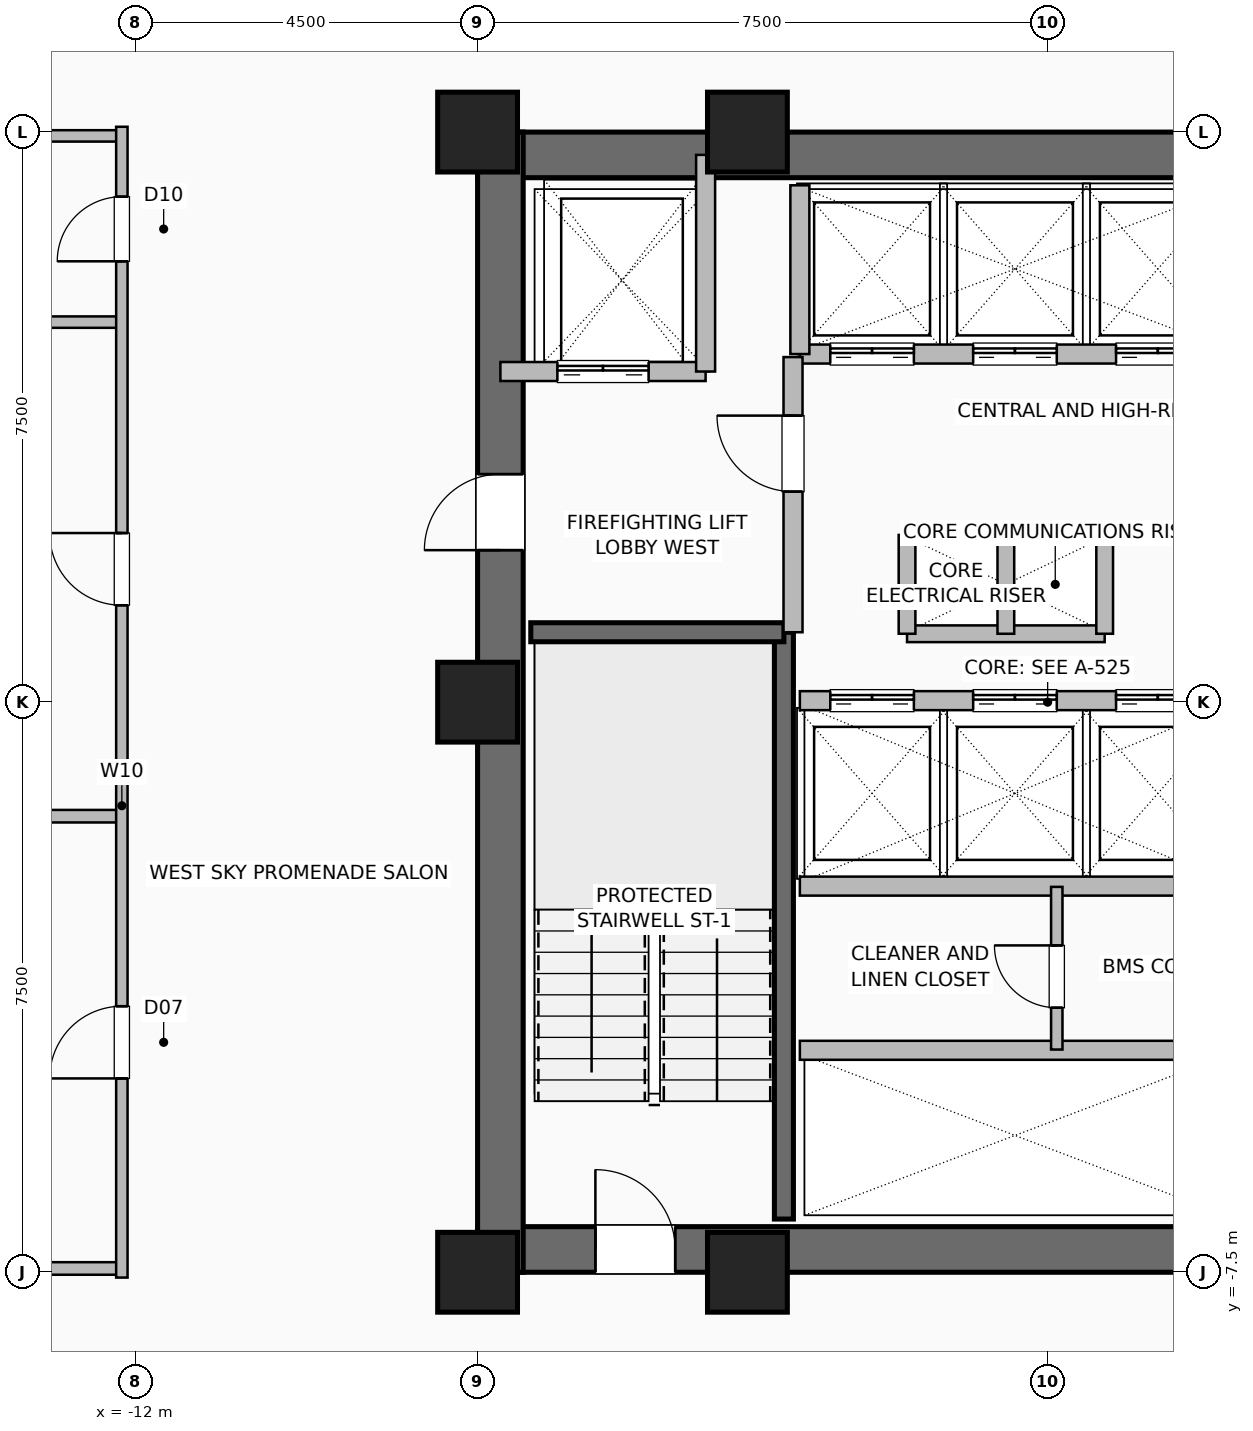
"""IFC4 building model, lengths in metres.
Left out: names, types, materials, properties, quantities, classifications, styles, units other than length and angle.
Written with IfcOpenShell. Run it as: python <this file> out.ifc"""

import sys

from ifc_helpers import new_model, si_unit, direction, frame, frame_2d, origin, origin_2d, place, context, subcontext, project, spatial, rectangle, hollow_rectangle, extrude, element, fill, save


model = new_model("IFC4")
c1 = context("Model", 3, precision=1e-05, world=origin(), true_north=direction((0.0, 1.0)))
c2 = subcontext(c1, "Body", "Model", "MODEL_VIEW")
j1 = project(units=[si_unit("LENGTHUNIT", "METRE"), si_unit("PLANEANGLEUNIT", "RADIAN")], contexts=[c1])
p1 = place(None, origin())
s1 = spatial("IfcSite", under=j1, at=p1, CompositionType="ELEMENT")
p2 = place(p1, origin())
s2 = spatial("IfcBuilding", under=s1, at=p2, CompositionType="ELEMENT")
p3 = place(p2, frame((0.0, 0.0, 97.6)))
s3 = spatial("IfcBuildingStorey", under=s2, at=p3, CompositionType="ELEMENT", Elevation=97.6)
for number, where, z_axis, x_axis in (
    (1, (-7.5, -7.5, 0.0), (0.0, 0.0, 1.0), (1.0, 0.0, 0.0)),
    (2, (-3.95, -7.5, 0.0), (0.0, 0.0, 1.0), (1.0, 0.0, 0.0)),
    (3, (-3.95, 7.5, 0.0), (0.0, 0.0, 1.0), (1.0, 0.0, 0.0)),
    (4, (-7.5, 7.5, 0.0), (0.0, 0.0, 1.0), (1.0, 0.0, 0.0)),
    (5, (-7.5, 0.0, 0.0), (0.0, 0.0, 1.0), (1.0, 0.0, 0.0)),
):
    element("IfcColumn", number, at=place(p3, frame(where, z_axis=z_axis, x_axis=x_axis)), inside=s3, PredefinedType="COLUMN", context=c2, shape_type="SweptSolid", body=[
        extrude(hollow_rectangle(XDim=1.05, YDim=1.05, WallThickness=0.05, at=origin_2d()), origin(), (0.0, 0.0, 1.0), 3.6),
    ])
p4 = place(p3, frame((-7.5, -7.2, 0.0), z_axis=(0.0, 0.0, 1.0), x_axis=(1.0, 0.0, 0.0)))
e6 = element("IfcWall", 6, at=p4, inside=s3, PredefinedType="SHEAR", context=c2, shape_type="SweptSolid", body=[
    extrude(rectangle(XDim=15.0, YDim=0.6, at=frame_2d((7.5, 0.0))), origin(), (0.0, 0.0, 1.0), 3.36),
])
p5 = place(p4, frame((1.55, 0.0, 0.0)))
e7 = element("IfcOpeningElement", 7, at=p5, cuts=e6, PredefinedType="OPENING", context=c2, shape_type="SweptSolid", body=[
    extrude(rectangle(XDim=1.05, YDim=2.08, at=frame_2d((0.525, 1.04))), frame((0.0, 0.31, 0.0), z_axis=(0.0, -1.0, 0.0), x_axis=(1.0, 0.0, 0.0)), (0.0, 0.0, 1.0), 0.62),
])
p6 = place(p4, frame((12.4, 0.0, 0.0)))
e8 = element("IfcOpeningElement", 8, at=p6, cuts=e6, PredefinedType="OPENING", context=c2, shape_type="SweptSolid", body=[
    extrude(rectangle(XDim=1.05, YDim=2.08, at=frame_2d((0.525, 1.04))), frame((0.0, 0.31, 0.0), z_axis=(0.0, -1.0, 0.0), x_axis=(1.0, 0.0, 0.0)), (0.0, 0.0, 1.0), 0.62),
])
p7 = place(p3, frame((-7.5, 7.2, 0.0), z_axis=(0.0, 0.0, 1.0), x_axis=(1.0, 0.0, 0.0)))
e9 = element("IfcWall", 9, at=p7, inside=s3, PredefinedType="SHEAR", context=c2, shape_type="SweptSolid", body=[
    extrude(rectangle(XDim=15.0, YDim=0.6, at=frame_2d((7.5, 0.0))), origin(), (0.0, 0.0, 1.0), 3.36),
])
p8 = place(p3, frame((-7.2, -7.5, 0.0), z_axis=(0.0, 0.0, 1.0), x_axis=(0.0, 1.0, 0.0)))
e10 = element("IfcWall", 10, at=p8, inside=s3, PredefinedType="SHEAR", context=c2, shape_type="SweptSolid", body=[
    extrude(rectangle(XDim=15.0, YDim=0.6, at=frame_2d((7.5, 0.0))), origin(), (0.0, 0.0, 1.0), 3.36),
])
p9 = place(p8, frame((9.5, 0.0, 0.0)))
e11 = element("IfcOpeningElement", 11, at=p9, cuts=e10, PredefinedType="OPENING", context=c2, shape_type="SweptSolid", body=[
    extrude(rectangle(XDim=1.0, YDim=2.08, at=frame_2d((0.5, 1.04))), frame((0.0, 0.31, 0.0), z_axis=(0.0, -1.0, 0.0), x_axis=(1.0, 0.0, 0.0)), (0.0, 0.0, 1.0), 0.62),
])
p10 = place(p3, frame((-3.47, -6.8, 0.0), z_axis=(0.0, 0.0, 1.0), x_axis=(0.0, 1.0, 0.0)))
e12 = element("IfcWall", 12, at=p10, inside=s3, PredefinedType="SHEAR", context=c2, shape_type="SweptSolid", body=[
    extrude(rectangle(XDim=7.72, YDim=0.25, at=frame_2d((3.86, 0.0))), origin(), (0.0, 0.0, 1.0), 3.36),
])
p11 = place(p3, frame((-6.8, 0.92, 0.0), z_axis=(0.0, 0.0, 1.0), x_axis=(1.0, 0.0, 0.0)))
e13 = element("IfcWall", 13, at=p11, inside=s3, PredefinedType="SHEAR", context=c2, shape_type="SweptSolid", body=[
    extrude(rectangle(XDim=3.33, YDim=0.25, at=frame_2d((1.665, 0.0))), origin(), (0.0, 0.0, 1.0), 3.36),
])
for number, where, z_axis, x_axis in (
    (14, (-1.85, 2.2, 0.0), (0.0, 0.0, 1.0), (1.0, 0.0, 0.0)),
    (15, (-1.85, 0.9, 0.0), (0.0, 0.0, 1.0), (1.0, 0.0, 0.0)),
):
    element("IfcWall", number, at=place(p3, frame(where, z_axis=z_axis, x_axis=x_axis)), inside=s3, PredefinedType="PARTITIONING", context=c2, shape_type="SweptSolid", body=[
        extrude(rectangle(XDim=2.6, YDim=0.22, at=frame_2d((1.3, 0.0))), origin(), (0.0, 0.0, 1.0), 3.36),
    ])
for number, where, z_axis, x_axis in (
    (16, (-0.55, 0.9, 0.0), (0.0, 0.0, 1.0), (0.0, 1.0, 0.0)),
    (17, (0.75, 0.9, 0.0), (0.0, 0.0, 1.0), (0.0, 1.0, 0.0)),
    (18, (-1.85, 0.9, 0.0), (0.0, 0.0, 1.0), (0.0, 1.0, 0.0)),
):
    element("IfcWall", number, at=place(p3, frame(where, z_axis=z_axis, x_axis=x_axis)), inside=s3, PredefinedType="PARTITIONING", context=c2, shape_type="SweptSolid", body=[
        extrude(rectangle(XDim=1.3, YDim=0.22, at=frame_2d((0.65, 0.0))), origin(), (0.0, 0.0, 1.0), 3.36),
    ])
p12 = place(p3, frame((-3.26, -4.58, 0.0), z_axis=(0.0, 0.0, 1.0), x_axis=(1.0, 0.0, 0.0)))
e19 = element("IfcWall", 19, at=p12, inside=s3, PredefinedType="SHEAR", context=c2, shape_type="SweptSolid", body=[
    extrude(rectangle(XDim=5.64, YDim=0.25, at=frame_2d((2.82, 0.0))), origin(), (0.0, 0.0, 1.0), 3.36),
])
p13 = place(p3, frame((-3.26, 0.02, 0.0), z_axis=(0.0, 0.0, 1.0), x_axis=(1.0, 0.0, 0.0)))
e20 = element("IfcWall", 20, at=p13, inside=s3, PredefinedType="SHEAR", context=c2, shape_type="SweptSolid", body=[
    extrude(rectangle(XDim=5.64, YDim=0.25, at=frame_2d((2.82, 0.0))), origin(), (0.0, 0.0, 1.0), 3.36),
])
p14 = place(p13, frame((0.4, 0.0, 0.0)))
e21 = element("IfcOpeningElement", 21, at=p14, cuts=e20, PredefinedType="OPENING", context=c2, shape_type="SweptSolid", body=[
    extrude(rectangle(XDim=1.1, YDim=2.2, at=frame_2d((0.55, 1.1))), frame((0.0, 0.135, 0.0), z_axis=(0.0, -1.0, 0.0), x_axis=(1.0, 0.0, 0.0)), (0.0, 0.0, 1.0), 0.27),
])
p15 = place(p13, frame((2.28, 0.0, 0.0)))
e22 = element("IfcOpeningElement", 22, at=p15, cuts=e20, PredefinedType="OPENING", context=c2, shape_type="SweptSolid", body=[
    extrude(rectangle(XDim=1.1, YDim=2.2, at=frame_2d((0.55, 1.1))), frame((0.0, 0.135, 0.0), z_axis=(0.0, -1.0, 0.0), x_axis=(1.0, 0.0, 0.0)), (0.0, 0.0, 1.0), 0.27),
])
p16 = place(p13, frame((4.16, 0.0, 0.0)))
e23 = element("IfcOpeningElement", 23, at=p16, cuts=e20, PredefinedType="OPENING", context=c2, shape_type="SweptSolid", body=[
    extrude(rectangle(XDim=1.1, YDim=2.2, at=frame_2d((0.55, 1.1))), frame((0.0, 0.135, 0.0), z_axis=(0.0, -1.0, 0.0), x_axis=(1.0, 0.0, 0.0)), (0.0, 0.0, 1.0), 0.27),
])
p17 = place(p3, frame((-3.26, -2.42, 0.0), z_axis=(0.0, 0.0, 1.0), x_axis=(1.0, 0.0, 0.0)))
e24 = element("IfcWall", 24, at=p17, inside=s3, PredefinedType="SHEAR", context=c2, shape_type="SweptSolid", body=[
    extrude(rectangle(XDim=5.64, YDim=0.25, at=frame_2d((2.82, 0.0))), origin(), (0.0, 0.0, 1.0), 3.36),
])
p18 = place(p3, frame((-3.26, 4.58, 0.0), z_axis=(0.0, 0.0, 1.0), x_axis=(1.0, 0.0, 0.0)))
e25 = element("IfcWall", 25, at=p18, inside=s3, PredefinedType="SHEAR", context=c2, shape_type="SweptSolid", body=[
    extrude(rectangle(XDim=5.64, YDim=0.25, at=frame_2d((2.82, 0.0))), origin(), (0.0, 0.0, 1.0), 3.36),
])
p19 = place(p18, frame((0.4, 0.0, 0.0)))
e26 = element("IfcOpeningElement", 26, at=p19, cuts=e25, PredefinedType="OPENING", context=c2, shape_type="SweptSolid", body=[
    extrude(rectangle(XDim=1.1, YDim=2.2, at=frame_2d((0.55, 1.1))), frame((0.0, 0.135, 0.0), z_axis=(0.0, -1.0, 0.0), x_axis=(1.0, 0.0, 0.0)), (0.0, 0.0, 1.0), 0.27),
])
p20 = place(p18, frame((2.28, 0.0, 0.0)))
e27 = element("IfcOpeningElement", 27, at=p20, cuts=e25, PredefinedType="OPENING", context=c2, shape_type="SweptSolid", body=[
    extrude(rectangle(XDim=1.1, YDim=2.2, at=frame_2d((0.55, 1.1))), frame((0.0, 0.135, 0.0), z_axis=(0.0, -1.0, 0.0), x_axis=(1.0, 0.0, 0.0)), (0.0, 0.0, 1.0), 0.27),
])
p21 = place(p18, frame((4.16, 0.0, 0.0)))
e28 = element("IfcOpeningElement", 28, at=p21, cuts=e25, PredefinedType="OPENING", context=c2, shape_type="SweptSolid", body=[
    extrude(rectangle(XDim=1.1, YDim=2.2, at=frame_2d((0.55, 1.1))), frame((0.0, 0.135, 0.0), z_axis=(0.0, -1.0, 0.0), x_axis=(1.0, 0.0, 0.0)), (0.0, 0.0, 1.0), 0.27),
])
p22 = place(p3, frame((-3.26, 4.58, 0.0), z_axis=(0.0, 0.0, 1.0), x_axis=(0.0, 1.0, 0.0)))
e29 = element("IfcWall", 29, at=p22, inside=s3, PredefinedType="SHEAR", context=c2, shape_type="SweptSolid", body=[
    extrude(rectangle(XDim=2.22, YDim=0.25, at=frame_2d((1.11, 0.0))), origin(), (0.0, 0.0, 1.0), 3.36),
])
p23 = place(p3, frame((-7.2, 4.35, 0.0), z_axis=(0.0, 0.0, 1.0), x_axis=(1.0, 0.0, 0.0)))
e30 = element("IfcWall", 30, at=p23, inside=s3, PredefinedType="SHEAR", context=c2, shape_type="SweptSolid", body=[
    extrude(rectangle(XDim=2.7, YDim=0.25, at=frame_2d((1.35, 0.0))), origin(), (0.0, 0.0, 1.0), 3.36),
])
p24 = place(p23, frame((0.75, 0.0, 0.0)))
e31 = element("IfcOpeningElement", 31, at=p24, cuts=e30, PredefinedType="OPENING", context=c2, shape_type="SweptSolid", body=[
    extrude(rectangle(XDim=1.2, YDim=2.2, at=frame_2d((0.6, 1.1))), frame((0.0, 0.135, 0.0), z_axis=(0.0, -1.0, 0.0), x_axis=(1.0, 0.0, 0.0)), (0.0, 0.0, 1.0), 0.27),
])
p25 = place(p3, frame((-4.5, 4.35, 0.0), z_axis=(0.0, 0.0, 1.0), x_axis=(0.0, 1.0, 0.0)))
e32 = element("IfcWall", 32, at=p25, inside=s3, PredefinedType="SHEAR", context=c2, shape_type="SweptSolid", body=[
    extrude(rectangle(XDim=2.85, YDim=0.25, at=frame_2d((1.425, 0.0))), origin(), (0.0, 0.0, 1.0), 3.36),
])
p26 = place(p3, frame((-3.35, 0.92, 0.0), z_axis=(0.0, 0.0, 1.0), x_axis=(0.0, 1.0, 0.0)))
e33 = element("IfcWall", 33, at=p26, inside=s3, PredefinedType="SHEAR", context=c2, shape_type="SweptSolid", body=[
    extrude(rectangle(XDim=3.62, YDim=0.25, at=frame_2d((1.81, 0.0))), origin(), (0.0, 0.0, 1.0), 3.36),
])
p27 = place(p26, frame((1.85, 0.0, 0.0)))
e34 = element("IfcOpeningElement", 34, at=p27, cuts=e33, PredefinedType="OPENING", context=c2, shape_type="SweptSolid", body=[
    extrude(rectangle(XDim=1.0, YDim=2.08, at=frame_2d((0.5, 1.04))), frame((0.0, 0.135, 0.0), z_axis=(0.0, -1.0, 0.0), x_axis=(1.0, 0.0, 0.0)), (0.0, 0.0, 1.0), 0.27),
])
p28 = place(p3, frame((0.12, -4.57, 0.0), z_axis=(0.0, 0.0, 1.0), x_axis=(0.0, 1.0, 0.0)))
e35 = element("IfcWall", 35, at=p28, inside=s3, PredefinedType="PARTITIONING", context=c2, shape_type="SweptSolid", body=[
    extrude(rectangle(XDim=2.14, YDim=0.15, at=frame_2d((1.07, 0.0))), origin(), (0.0, 0.0, 1.0), 3.36),
])
p29 = place(p28, frame((0.55, 0.0, 0.0)))
e36 = element("IfcOpeningElement", 36, at=p29, cuts=e35, PredefinedType="OPENING", context=c2, shape_type="SweptSolid", body=[
    extrude(rectangle(XDim=0.82, YDim=2.05, at=frame_2d((0.41, 1.025))), frame((0.0, 0.085, 0.0), z_axis=(0.0, -1.0, 0.0), x_axis=(1.0, 0.0, 0.0)), (0.0, 0.0, 1.0), 0.17),
])
for number, where, z_axis, x_axis in (
    (37, (-21.82, -7.45, 0.0), (0.0, 0.0, 1.0), (1.0, 0.0, 0.0)),
    (38, (-21.82, -1.5, 0.0), (0.0, 0.0, 1.0), (1.0, 0.0, 0.0)),
):
    element("IfcWall", number, at=place(p3, frame(where, z_axis=z_axis, x_axis=x_axis)), inside=s3, PredefinedType="PLUMBINGWALL", context=c2, shape_type="SweptSolid", body=[
        extrude(rectangle(XDim=9.64, YDim=0.165, at=frame_2d((4.82, 0.0))), origin(), (0.0, 0.0, 1.0), 3.36),
    ])
for number, where, z_axis, x_axis in (
    (39, (-21.82, 5.0, 0.0), (0.0, 0.0, 1.0), (1.0, 0.0, 0.0)),
    (40, (-21.82, 7.45, 0.0), (0.0, 0.0, 1.0), (1.0, 0.0, 0.0)),
):
    element("IfcWall", number, at=place(p3, frame(where, z_axis=z_axis, x_axis=x_axis)), inside=s3, PredefinedType="PARTITIONING", context=c2, shape_type="SweptSolid", body=[
        extrude(rectangle(XDim=9.64, YDim=0.15, at=frame_2d((4.82, 0.0))), origin(), (0.0, 0.0, 1.0), 3.36),
    ])
p30 = place(p3, frame((-12.18, -7.57, 0.0), z_axis=(0.0, 0.0, 1.0), x_axis=(0.0, 1.0, 0.0)))
e41 = element("IfcWall", 41, at=p30, inside=s3, PredefinedType="PARTITIONING", context=c2, shape_type="SweptSolid", body=[
    extrude(rectangle(XDim=15.14, YDim=0.15, at=frame_2d((7.57, 0.0))), origin(), (0.0, 0.0, 1.0), 3.36),
])
p31 = place(p30, frame((2.62, 0.0, 0.0)))
e42 = element("IfcOpeningElement", 42, at=p31, cuts=e41, PredefinedType="OPENING", context=c2, shape_type="SweptSolid", body=[
    extrude(rectangle(XDim=0.95, YDim=2.06, at=frame_2d((0.475, 1.03))), frame((0.0, 0.085, 0.0), z_axis=(0.0, -1.0, 0.0), x_axis=(1.0, 0.0, 0.0)), (0.0, 0.0, 1.0), 0.17),
])
p32 = place(p30, frame((8.845, 0.0, 0.0)))
e43 = element("IfcOpeningElement", 43, at=p32, cuts=e41, PredefinedType="OPENING", context=c2, shape_type="SweptSolid", body=[
    extrude(rectangle(XDim=0.95, YDim=2.06, at=frame_2d((0.475, 1.03))), frame((0.0, 0.085, 0.0), z_axis=(0.0, -1.0, 0.0), x_axis=(1.0, 0.0, 0.0)), (0.0, 0.0, 1.0), 0.17),
])
p33 = place(p30, frame((13.37, 0.0, 0.0)))
e44 = element("IfcOpeningElement", 44, at=p33, cuts=e41, PredefinedType="OPENING", context=c2, shape_type="SweptSolid", body=[
    extrude(rectangle(XDim=0.85, YDim=2.05, at=frame_2d((0.425, 1.025))), frame((0.0, 0.085, 0.0), z_axis=(0.0, -1.0, 0.0), x_axis=(1.0, 0.0, 0.0)), (0.0, 0.0, 1.0), 0.17),
])
p34 = place(p5, origin())
e45 = element("IfcDoor", 45, at=p34, inside=s3, OperationType="SINGLE_SWING_LEFT", PredefinedType="DOOR", context=c2, shape_type="SweptSolid", body=[
    extrude(rectangle(XDim=1.05, YDim=2.08, at=frame_2d((0.525, 1.04))), frame((0.0, 0.025, 0.0), z_axis=(0.0, -1.0, 0.0), x_axis=(1.0, 0.0, 0.0)), (0.0, 0.0, 1.0), 0.05),
])
fill(e7, e45)
p35 = place(p9, origin())
e46 = element("IfcDoor", 46, at=p35, inside=s3, OperationType="SINGLE_SWING_LEFT", PredefinedType="DOOR", context=c2, shape_type="SweptSolid", body=[
    extrude(rectangle(XDim=1.0, YDim=2.08, at=frame_2d((0.5, 1.04))), frame((0.0, 0.025, 0.0), z_axis=(0.0, -1.0, 0.0), x_axis=(1.0, 0.0, 0.0)), (0.0, 0.0, 1.0), 0.05),
])
fill(e11, e46)
p36 = place(p14, origin())
e47 = element("IfcDoor", 47, at=p36, inside=s3, OperationType="DOUBLE_DOOR_SLIDING", PredefinedType="DOOR", context=c2, shape_type="SweptSolid", body=[
    extrude(rectangle(XDim=1.1, YDim=2.2, at=frame_2d((0.55, 1.1))), frame((0.0, 0.025, 0.0), z_axis=(0.0, -1.0, 0.0), x_axis=(1.0, 0.0, 0.0)), (0.0, 0.0, 1.0), 0.05),
])
fill(e21, e47)
p37 = place(p15, origin())
e48 = element("IfcDoor", 48, at=p37, inside=s3, OperationType="DOUBLE_DOOR_SLIDING", PredefinedType="DOOR", context=c2, shape_type="SweptSolid", body=[
    extrude(rectangle(XDim=1.1, YDim=2.2, at=frame_2d((0.55, 1.1))), frame((0.0, 0.025, 0.0), z_axis=(0.0, -1.0, 0.0), x_axis=(1.0, 0.0, 0.0)), (0.0, 0.0, 1.0), 0.05),
])
fill(e22, e48)
p38 = place(p16, origin())
e49 = element("IfcDoor", 49, at=p38, inside=s3, OperationType="DOUBLE_DOOR_SLIDING", PredefinedType="DOOR", context=c2, shape_type="SweptSolid", body=[
    extrude(rectangle(XDim=1.1, YDim=2.2, at=frame_2d((0.55, 1.1))), frame((0.0, 0.025, 0.0), z_axis=(0.0, -1.0, 0.0), x_axis=(1.0, 0.0, 0.0)), (0.0, 0.0, 1.0), 0.05),
])
fill(e23, e49)
p39 = place(p19, origin())
e50 = element("IfcDoor", 50, at=p39, inside=s3, OperationType="DOUBLE_DOOR_SLIDING", PredefinedType="DOOR", context=c2, shape_type="SweptSolid", body=[
    extrude(rectangle(XDim=1.1, YDim=2.2, at=frame_2d((0.55, 1.1))), frame((0.0, 0.025, 0.0), z_axis=(0.0, -1.0, 0.0), x_axis=(1.0, 0.0, 0.0)), (0.0, 0.0, 1.0), 0.05),
])
fill(e26, e50)
p40 = place(p20, origin())
e51 = element("IfcDoor", 51, at=p40, inside=s3, OperationType="DOUBLE_DOOR_SLIDING", PredefinedType="DOOR", context=c2, shape_type="SweptSolid", body=[
    extrude(rectangle(XDim=1.1, YDim=2.2, at=frame_2d((0.55, 1.1))), frame((0.0, 0.025, 0.0), z_axis=(0.0, -1.0, 0.0), x_axis=(1.0, 0.0, 0.0)), (0.0, 0.0, 1.0), 0.05),
])
fill(e27, e51)
p41 = place(p21, origin())
e52 = element("IfcDoor", 52, at=p41, inside=s3, OperationType="DOUBLE_DOOR_SLIDING", PredefinedType="DOOR", context=c2, shape_type="SweptSolid", body=[
    extrude(rectangle(XDim=1.1, YDim=2.2, at=frame_2d((0.55, 1.1))), frame((0.0, 0.025, 0.0), z_axis=(0.0, -1.0, 0.0), x_axis=(1.0, 0.0, 0.0)), (0.0, 0.0, 1.0), 0.05),
])
fill(e28, e52)
p42 = place(p24, origin())
e53 = element("IfcDoor", 53, at=p42, inside=s3, OperationType="DOUBLE_DOOR_SLIDING", PredefinedType="DOOR", context=c2, shape_type="SweptSolid", body=[
    extrude(rectangle(XDim=1.2, YDim=2.2, at=frame_2d((0.6, 1.1))), frame((0.0, 0.025, 0.0), z_axis=(0.0, -1.0, 0.0), x_axis=(1.0, 0.0, 0.0)), (0.0, 0.0, 1.0), 0.05),
])
fill(e31, e53)
p43 = place(p27, origin())
e54 = element("IfcDoor", 54, at=p43, inside=s3, OperationType="SINGLE_SWING_RIGHT", PredefinedType="DOOR", context=c2, shape_type="SweptSolid", body=[
    extrude(rectangle(XDim=1.0, YDim=2.08, at=frame_2d((0.5, 1.04))), frame((0.0, 0.025, 0.0), z_axis=(0.0, -1.0, 0.0), x_axis=(1.0, 0.0, 0.0)), (0.0, 0.0, 1.0), 0.05),
])
fill(e34, e54)
p44 = place(p29, origin())
e55 = element("IfcDoor", 55, at=p44, inside=s3, OperationType="SINGLE_SWING_RIGHT", PredefinedType="DOOR", context=c2, shape_type="SweptSolid", body=[
    extrude(rectangle(XDim=0.82, YDim=2.05, at=frame_2d((0.41, 1.025))), frame((0.0, 0.025, 0.0), z_axis=(0.0, -1.0, 0.0), x_axis=(1.0, 0.0, 0.0)), (0.0, 0.0, 1.0), 0.05),
])
fill(e36, e55)
p45 = place(p31, origin())
e56 = element("IfcDoor", 56, at=p45, inside=s3, OperationType="SINGLE_SWING_LEFT", PredefinedType="DOOR", context=c2, shape_type="SweptSolid", body=[
    extrude(rectangle(XDim=0.95, YDim=2.06, at=frame_2d((0.475, 1.03))), frame((0.0, 0.025, 0.0), z_axis=(0.0, -1.0, 0.0), x_axis=(1.0, 0.0, 0.0)), (0.0, 0.0, 1.0), 0.05),
])
fill(e42, e56)
p46 = place(p32, origin())
e57 = element("IfcDoor", 57, at=p46, inside=s3, OperationType="SINGLE_SWING_RIGHT", PredefinedType="DOOR", context=c2, shape_type="SweptSolid", body=[
    extrude(rectangle(XDim=0.95, YDim=2.06, at=frame_2d((0.475, 1.03))), frame((0.0, 0.025, 0.0), z_axis=(0.0, -1.0, 0.0), x_axis=(1.0, 0.0, 0.0)), (0.0, 0.0, 1.0), 0.05),
])
fill(e43, e57)
p47 = place(p33, origin())
e58 = element("IfcDoor", 58, at=p47, inside=s3, OperationType="SINGLE_SWING_LEFT", PredefinedType="DOOR", context=c2, shape_type="SweptSolid", body=[
    extrude(rectangle(XDim=0.85, YDim=2.05, at=frame_2d((0.425, 1.025))), frame((0.0, 0.025, 0.0), z_axis=(0.0, -1.0, 0.0), x_axis=(1.0, 0.0, 0.0)), (0.0, 0.0, 1.0), 0.05),
])
fill(e44, e58)
save(model, sys.argv[1])
